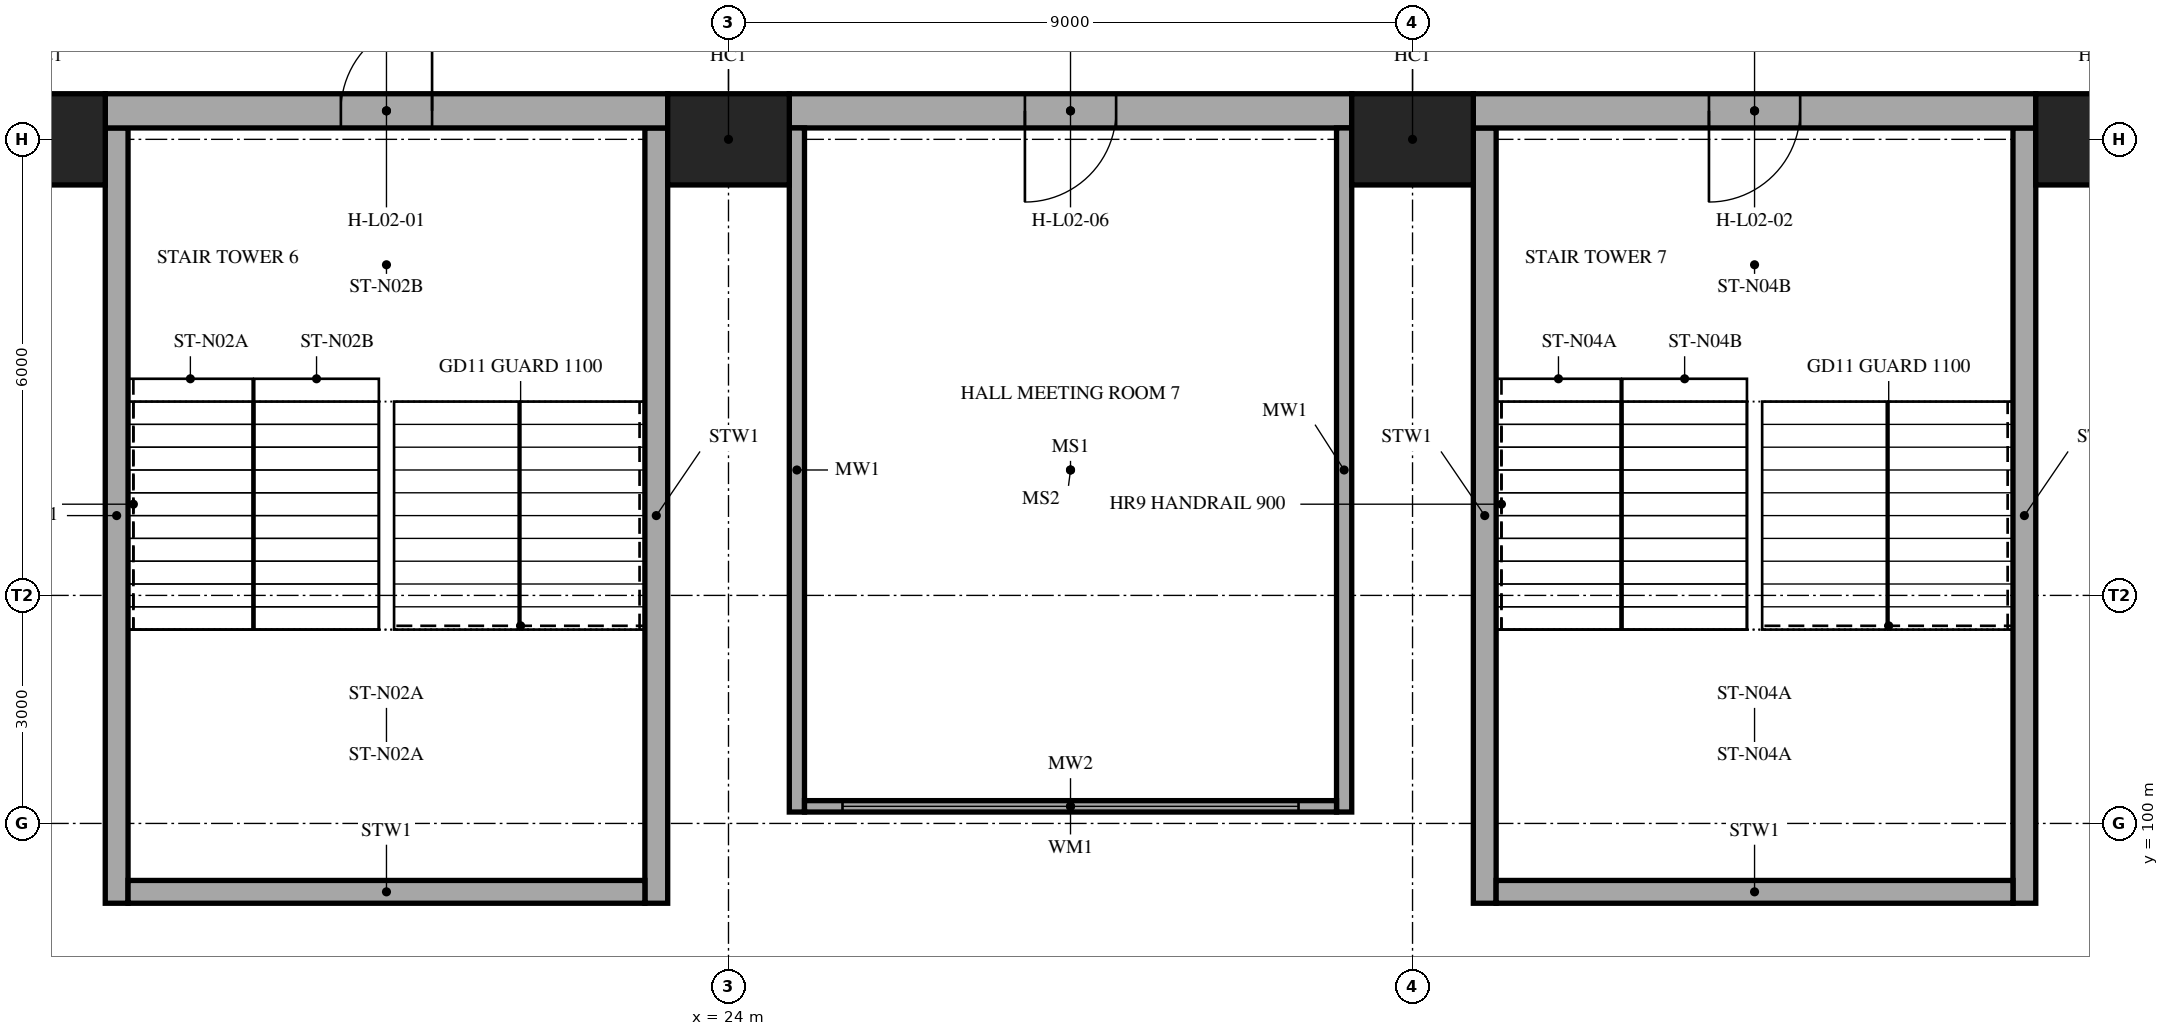
"""IFC4 building model, lengths in metres.
Left out: names, types, materials, properties, quantities, classifications, styles, units other than length and angle.
Written with IfcOpenShell. Run it as: python <this file> out.ifc"""

import sys

from ifc_helpers import new_model, si_unit, direction, frame, frame_2d, origin, origin_2d, place, context, subcontext, project, spatial, rectangle, extrude, element, fill, save


model = new_model("IFC4")
c1 = context("Model", 3, precision=1e-05, world=origin(), true_north=direction((0.0, 1.0)))
c2 = subcontext(c1, "Body", "Model", "MODEL_VIEW")
j1 = project(units=[si_unit("LENGTHUNIT", "METRE"), si_unit("PLANEANGLEUNIT", "RADIAN")], contexts=[c1])
p1 = place(None, origin())
s1 = spatial("IfcSite", under=j1, at=p1, CompositionType="ELEMENT")
p2 = place(p1, origin())
s2 = spatial("IfcBuilding", under=s1, at=p2, CompositionType="ELEMENT")
p3 = place(p2, frame((0.0, 0.0, 10.0)))
s3 = spatial("IfcBuildingStorey", under=s2, at=p3, CompositionType="ELEMENT", Elevation=10.0)
for number, where, z_axis, x_axis in (
    (1, (15.0, 109.0, 0.0), (0.0, 0.0, 1.0), (1.0, 0.0, 0.0)),
    (2, (24.0, 109.0, 0.0), (0.0, 0.0, 1.0), (1.0, 0.0, 0.0)),
    (3, (33.0, 109.0, 0.0), (0.0, 0.0, 1.0), (1.0, 0.0, 0.0)),
    (4, (42.0, 109.0, 0.0), (0.0, 0.0, 1.0), (1.0, 0.0, 0.0)),
):
    element("IfcColumn", number, at=place(p3, frame(where, z_axis=z_axis, x_axis=x_axis)), inside=s3, PredefinedType="COLUMN", context=c2, shape_type="SweptSolid", body=[
        extrude(rectangle(XDim=1.6, YDim=1.2, at=origin_2d()), origin(), (0.0, 0.0, 1.0), 5.0),
    ])
for number, where, z_axis, x_axis in (
    (5, (15.95, 109.15, 0.0), (0.0, 0.0, 1.0), (0.0, -1.0, 0.0)),
    (6, (23.05, 109.15, 0.0), (0.0, 0.0, 1.0), (0.0, -1.0, 0.0)),
):
    element("IfcWall", number, at=place(p3, frame(where, z_axis=z_axis, x_axis=x_axis)), inside=s3, PredefinedType="SHEAR", context=c2, shape_type="SweptSolid", body=[
        extrude(rectangle(XDim=10.2, YDim=0.3, at=frame_2d((5.1, 0.0))), origin(), (0.0, 0.0, 1.0), 5.0),
    ])
p4 = place(p3, frame((16.1, 99.1, 0.0), z_axis=(0.0, 0.0, 1.0), x_axis=(1.0, 0.0, 0.0)))
e7 = element("IfcWall", 7, at=p4, inside=s3, PredefinedType="SHEAR", context=c2, shape_type="SweptSolid", body=[
    extrude(rectangle(XDim=6.8, YDim=0.3, at=frame_2d((3.4, 0.0))), origin(), (0.0, 0.0, 1.0), 5.0),
])
for number, where, z_axis, x_axis in (
    (8, (33.95, 109.15, 0.0), (0.0, 0.0, 1.0), (0.0, -1.0, 0.0)),
    (9, (41.05, 109.15, 0.0), (0.0, 0.0, 1.0), (0.0, -1.0, 0.0)),
):
    element("IfcWall", number, at=place(p3, frame(where, z_axis=z_axis, x_axis=x_axis)), inside=s3, PredefinedType="SHEAR", context=c2, shape_type="SweptSolid", body=[
        extrude(rectangle(XDim=10.2, YDim=0.3, at=frame_2d((5.1, 0.0))), origin(), (0.0, 0.0, 1.0), 5.0),
    ])
p5 = place(p3, frame((34.1, 99.1, 0.0), z_axis=(0.0, 0.0, 1.0), x_axis=(1.0, 0.0, 0.0)))
e10 = element("IfcWall", 10, at=p5, inside=s3, PredefinedType="SHEAR", context=c2, shape_type="SweptSolid", body=[
    extrude(rectangle(XDim=6.8, YDim=0.3, at=frame_2d((3.4, 0.0))), origin(), (0.0, 0.0, 1.0), 5.0),
])
p6 = place(p3, frame((15.8, 109.375, 0.0), z_axis=(0.0, 0.0, 1.0), x_axis=(1.0, 0.0, 0.0)))
e11 = element("IfcWall", 11, at=p6, inside=s3, PredefinedType="SOLIDWALL", context=c2, shape_type="SweptSolid", body=[
    extrude(rectangle(XDim=7.4, YDim=0.45, at=frame_2d((3.7, 0.0))), origin(), (0.0, 0.0, 1.0), 5.0),
])
p7 = place(p6, frame((3.1, 0.0, 0.0)))
e12 = element("IfcOpeningElement", 12, at=p7, cuts=e11, PredefinedType="OPENING", context=c2, shape_type="SweptSolid", body=[
    extrude(rectangle(XDim=1.2, YDim=2.1, at=frame_2d((0.6, 1.05))), frame((0.0, 0.235, 0.0), z_axis=(0.0, -1.0, 0.0), x_axis=(1.0, 0.0, 0.0)), (0.0, 0.0, 1.0), 0.47),
])
p8 = place(p3, frame((24.8, 109.375, 0.0), z_axis=(0.0, 0.0, 1.0), x_axis=(1.0, 0.0, 0.0)))
e13 = element("IfcWall", 13, at=p8, inside=s3, PredefinedType="SOLIDWALL", context=c2, shape_type="SweptSolid", body=[
    extrude(rectangle(XDim=7.4, YDim=0.45, at=frame_2d((3.7, 0.0))), origin(), (0.0, 0.0, 1.0), 5.0),
])
p9 = place(p8, frame((3.1, 0.0, 0.0)))
e14 = element("IfcOpeningElement", 14, at=p9, cuts=e13, PredefinedType="OPENING", context=c2, shape_type="SweptSolid", body=[
    extrude(rectangle(XDim=1.2, YDim=2.1, at=frame_2d((0.6, 1.05))), frame((0.0, 0.235, 0.0), z_axis=(0.0, -1.0, 0.0), x_axis=(1.0, 0.0, 0.0)), (0.0, 0.0, 1.0), 0.47),
])
p10 = place(p3, frame((33.8, 109.375, 0.0), z_axis=(0.0, 0.0, 1.0), x_axis=(1.0, 0.0, 0.0)))
e15 = element("IfcWall", 15, at=p10, inside=s3, PredefinedType="SOLIDWALL", context=c2, shape_type="SweptSolid", body=[
    extrude(rectangle(XDim=7.4, YDim=0.45, at=frame_2d((3.7, 0.0))), origin(), (0.0, 0.0, 1.0), 5.0),
])
p11 = place(p10, frame((3.1, 0.0, 0.0)))
e16 = element("IfcOpeningElement", 16, at=p11, cuts=e15, PredefinedType="OPENING", context=c2, shape_type="SweptSolid", body=[
    extrude(rectangle(XDim=1.2, YDim=2.1, at=frame_2d((0.6, 1.05))), frame((0.0, 0.235, 0.0), z_axis=(0.0, -1.0, 0.0), x_axis=(1.0, 0.0, 0.0)), (0.0, 0.0, 1.0), 0.47),
])
for number, where, z_axis, x_axis in (
    (17, (24.9, 100.15, 0.0), (0.0, 0.0, 1.0), (0.0, 1.0, 0.0)),
    (18, (32.1, 100.15, 0.0), (0.0, 0.0, 1.0), (0.0, 1.0, 0.0)),
):
    element("IfcWall", number, at=place(p3, frame(where, z_axis=z_axis, x_axis=x_axis)), inside=s3, PredefinedType="SHEAR", context=c2, shape_type="SweptSolid", body=[
        extrude(rectangle(XDim=9.0, YDim=0.2, at=frame_2d((4.5, 0.0))), origin(), (0.0, 0.0, 1.0), 4.25),
    ])
p12 = place(p3, frame((25.0, 100.225, 0.0), z_axis=(0.0, 0.0, 1.0), x_axis=(1.0, 0.0, 0.0)))
e19 = element("IfcWall", 19, at=p12, inside=s3, PredefinedType="PARTITIONING", context=c2, shape_type="SweptSolid", body=[
    extrude(rectangle(XDim=7.0, YDim=0.15, at=frame_2d((3.5, 0.0))), origin(), (0.0, 0.0, 1.0), 4.25),
])
p13 = place(p12, frame((0.5, 0.0, 0.9)))
e20 = element("IfcOpeningElement", 20, at=p13, cuts=e19, PredefinedType="OPENING", context=c2, shape_type="SweptSolid", body=[
    extrude(rectangle(XDim=6.0, YDim=2.7, at=frame_2d((3.0, 1.35))), frame((0.0, 0.085, 0.0), z_axis=(0.0, -1.0, 0.0), x_axis=(1.0, 0.0, 0.0)), (0.0, 0.0, 1.0), 0.17),
])
p14 = place(p7, origin())
e21 = element("IfcDoor", 21, at=p14, inside=s3, OperationType="SINGLE_SWING_RIGHT", PredefinedType="DOOR", context=c2, shape_type="SweptSolid", body=[
    extrude(rectangle(XDim=1.2, YDim=2.1, at=frame_2d((0.6, 1.05))), frame((0.0, 0.025, 0.0), z_axis=(0.0, -1.0, 0.0), x_axis=(1.0, 0.0, 0.0)), (0.0, 0.0, 1.0), 0.05),
])
fill(e12, e21)
p15 = place(p11, frame((1.2, 0.0, 0.0), z_axis=(0.0, 0.0, 1.0), x_axis=(-1.0, 0.0, 0.0)))
e22 = element("IfcDoor", 22, at=p15, inside=s3, OperationType="SINGLE_SWING_RIGHT", PredefinedType="DOOR", context=c2, shape_type="SweptSolid", body=[
    extrude(rectangle(XDim=1.2, YDim=2.1, at=frame_2d((0.6, 1.05))), frame((0.0, 0.025, 0.0), z_axis=(0.0, -1.0, 0.0), x_axis=(1.0, 0.0, 0.0)), (0.0, 0.0, 1.0), 0.05),
])
fill(e16, e22)
p16 = place(p13, origin())
e23 = element("IfcWindow", 23, at=p16, inside=s3, PartitioningType="TRIPLE_PANEL_VERTICAL", PredefinedType="WINDOW", context=c2, shape_type="SweptSolid", body=[
    extrude(rectangle(XDim=6.0, YDim=2.7, at=frame_2d((3.0, 1.35))), frame((0.0, 0.03, 0.0), z_axis=(0.0, -1.0, 0.0), x_axis=(1.0, 0.0, 0.0)), (0.0, 0.0, 1.0), 0.06),
])
fill(e20, e23)
p17 = place(p9, frame((1.2, 0.0, 0.0), z_axis=(0.0, 0.0, 1.0), x_axis=(-1.0, 0.0, 0.0)))
e24 = element("IfcDoor", 24, at=p17, inside=s3, OperationType="SINGLE_SWING_RIGHT", PredefinedType="DOOR", context=c2, shape_type="SweptSolid", body=[
    extrude(rectangle(XDim=1.2, YDim=2.1, at=frame_2d((0.6, 1.05))), frame((0.0, 0.025, 0.0), z_axis=(0.0, -1.0, 0.0), x_axis=(1.0, 0.0, 0.0)), (0.0, 0.0, 1.0), 0.05),
])
fill(e14, e24)
save(model, sys.argv[1])
